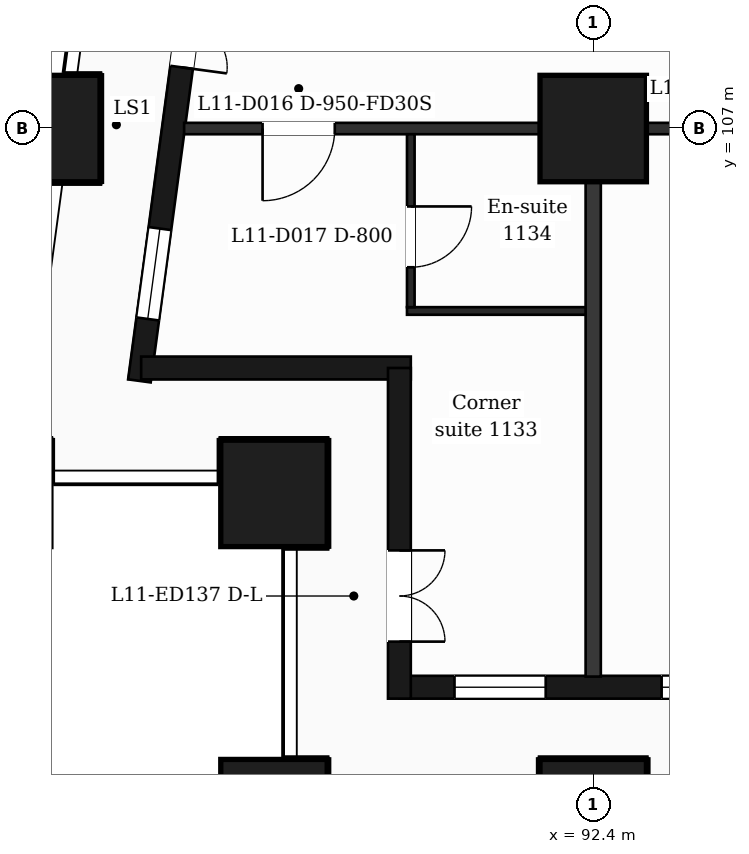
"""IFC4 building model, lengths in metres.
Left out: names, types, materials, properties, quantities, classifications, styles, units other than length and angle.
Written with IfcOpenShell. Run it as: python <this file> out.ifc"""

import sys

from ifc_helpers import new_model, si_unit, direction, frame, frame_2d, origin, origin_2d, place, context, subcontext, project, spatial, rectangle, extrude, element, fill, save


model = new_model("IFC4")
c1 = context("Model", 3, precision=1e-05, world=origin(), true_north=direction((0.0, 1.0)))
c2 = subcontext(c1, "Body", "Model", "MODEL_VIEW")
j1 = project(units=[si_unit("LENGTHUNIT", "METRE"), si_unit("PLANEANGLEUNIT", "RADIAN")], contexts=[c1])
p1 = place(None, origin())
s1 = spatial("IfcSite", under=j1, at=p1, CompositionType="ELEMENT")
p2 = place(p1, origin())
s2 = spatial("IfcBuilding", under=s1, at=p2, CompositionType="ELEMENT")
p3 = place(p2, frame((0.0, 0.0, 56.5)))
s3 = spatial("IfcBuildingStorey", under=s2, at=p3, CompositionType="ELEMENT", Elevation=56.5)
for number, where, z_axis, x_axis in (
    (1, (92.4, 98.0, 0.0), (0.0, 0.0, 1.0), (1.0, 0.0, 0.0)),
    (2, (88.2, 98.0, 0.0), (0.0, 0.0, 1.0), (1.0, 0.0, 0.0)),
    (3, (88.2, 102.2, 0.0), (0.0, 0.0, 1.0), (1.0, 0.0, 0.0)),
    (4, (92.4, 107.0, 0.0), (0.0, 0.0, 1.0), (1.0, 0.0, 0.0)),
    (5, (85.211, 107.0, 0.0), (0.0, 0.0, 1.0), (1.0, 0.0, 0.0)),
):
    element("IfcColumn", number, at=place(p3, frame(where, z_axis=z_axis, x_axis=x_axis)), inside=s3, PredefinedType="COLUMN", context=c2, shape_type="SweptSolid", body=[
        extrude(rectangle(XDim=1.4, YDim=1.4, at=origin_2d()), origin(), (0.0, 0.0, 1.0), 3.5),
    ])
p4 = place(p3, frame((89.85, 99.65, 0.0), z_axis=(0.0, 0.0, 1.0), x_axis=(1.0, 0.0, 0.0)))
e6 = element("IfcWall", 6, at=p4, inside=s3, PredefinedType="SOLIDWALL", context=c2, shape_type="SweptSolid", body=[
    extrude(rectangle(XDim=47.25, YDim=0.3, at=frame_2d((23.625, 0.0))), origin(), (0.0, 0.0, 1.0), 3.18),
])
p5 = place(p4, frame((0.725, 0.0, 0.9)))
e7 = element("IfcOpeningElement", 7, at=p5, cuts=e6, PredefinedType="OPENING", context=c2, shape_type="SweptSolid", body=[
    extrude(rectangle(XDim=1.2, YDim=2.1, at=frame_2d((0.6, 1.05))), frame((0.0, 0.16, 0.0), z_axis=(0.0, -1.0, 0.0), x_axis=(1.0, 0.0, 0.0)), (0.0, 0.0, 1.0), 0.32),
])
p6 = place(p4, frame((3.45, 0.0, 0.9)))
e8 = element("IfcOpeningElement", 8, at=p6, cuts=e6, PredefinedType="OPENING", context=c2, shape_type="SweptSolid", body=[
    extrude(rectangle(XDim=2.4, YDim=2.1, at=frame_2d((1.2, 1.05))), frame((0.0, 0.16, 0.0), z_axis=(0.0, -1.0, 0.0), x_axis=(1.0, 0.0, 0.0)), (0.0, 0.0, 1.0), 0.32),
])
p7 = place(p4, frame((7.35, 0.0, 0.0)))
e9 = element("IfcOpeningElement", 9, at=p7, cuts=e6, PredefinedType="OPENING", context=c2, shape_type="SweptSolid", body=[
    extrude(rectangle(XDim=1.2, YDim=2.4, at=frame_2d((0.6, 1.2))), frame((0.0, 0.16, 0.0), z_axis=(0.0, -1.0, 0.0), x_axis=(1.0, 0.0, 0.0)), (0.0, 0.0, 1.0), 0.32),
])
p8 = place(p4, frame((9.15, 0.0, 0.9)))
e10 = element("IfcOpeningElement", 10, at=p8, cuts=e6, PredefinedType="OPENING", context=c2, shape_type="SweptSolid", body=[
    extrude(rectangle(XDim=1.2, YDim=2.1, at=frame_2d((0.6, 1.05))), frame((0.0, 0.16, 0.0), z_axis=(0.0, -1.0, 0.0), x_axis=(1.0, 0.0, 0.0)), (0.0, 0.0, 1.0), 0.32),
])
p9 = place(p4, frame((11.85, 0.0, 0.9)))
e11 = element("IfcOpeningElement", 11, at=p9, cuts=e6, PredefinedType="OPENING", context=c2, shape_type="SweptSolid", body=[
    extrude(rectangle(XDim=2.4, YDim=2.1, at=frame_2d((1.2, 1.05))), frame((0.0, 0.16, 0.0), z_axis=(0.0, -1.0, 0.0), x_axis=(1.0, 0.0, 0.0)), (0.0, 0.0, 1.0), 0.32),
])
p10 = place(p4, frame((16.05, 0.0, 0.9)))
e12 = element("IfcOpeningElement", 12, at=p10, cuts=e6, PredefinedType="OPENING", context=c2, shape_type="SweptSolid", body=[
    extrude(rectangle(XDim=2.4, YDim=2.1, at=frame_2d((1.2, 1.05))), frame((0.0, 0.16, 0.0), z_axis=(0.0, -1.0, 0.0), x_axis=(1.0, 0.0, 0.0)), (0.0, 0.0, 1.0), 0.32),
])
p11 = place(p4, frame((20.85, 0.0, 0.9)))
e13 = element("IfcOpeningElement", 13, at=p11, cuts=e6, PredefinedType="OPENING", context=c2, shape_type="SweptSolid", body=[
    extrude(rectangle(XDim=1.2, YDim=2.1, at=frame_2d((0.6, 1.05))), frame((0.0, 0.16, 0.0), z_axis=(0.0, -1.0, 0.0), x_axis=(1.0, 0.0, 0.0)), (0.0, 0.0, 1.0), 0.32),
])
p12 = place(p4, frame((25.05, 0.0, 0.9)))
e14 = element("IfcOpeningElement", 14, at=p12, cuts=e6, PredefinedType="OPENING", context=c2, shape_type="SweptSolid", body=[
    extrude(rectangle(XDim=1.2, YDim=2.1, at=frame_2d((0.6, 1.05))), frame((0.0, 0.16, 0.0), z_axis=(0.0, -1.0, 0.0), x_axis=(1.0, 0.0, 0.0)), (0.0, 0.0, 1.0), 0.32),
])
p13 = place(p4, frame((28.65, 0.0, 0.9)))
e15 = element("IfcOpeningElement", 15, at=p13, cuts=e6, PredefinedType="OPENING", context=c2, shape_type="SweptSolid", body=[
    extrude(rectangle(XDim=2.4, YDim=2.1, at=frame_2d((1.2, 1.05))), frame((0.0, 0.16, 0.0), z_axis=(0.0, -1.0, 0.0), x_axis=(1.0, 0.0, 0.0)), (0.0, 0.0, 1.0), 0.32),
])
p14 = place(p4, frame((32.85, 0.0, 0.9)))
e16 = element("IfcOpeningElement", 16, at=p14, cuts=e6, PredefinedType="OPENING", context=c2, shape_type="SweptSolid", body=[
    extrude(rectangle(XDim=2.4, YDim=2.1, at=frame_2d((1.2, 1.05))), frame((0.0, 0.16, 0.0), z_axis=(0.0, -1.0, 0.0), x_axis=(1.0, 0.0, 0.0)), (0.0, 0.0, 1.0), 0.32),
])
p15 = place(p4, frame((37.05, 0.0, 0.9)))
e17 = element("IfcOpeningElement", 17, at=p15, cuts=e6, PredefinedType="OPENING", context=c2, shape_type="SweptSolid", body=[
    extrude(rectangle(XDim=2.4, YDim=2.1, at=frame_2d((1.2, 1.05))), frame((0.0, 0.16, 0.0), z_axis=(0.0, -1.0, 0.0), x_axis=(1.0, 0.0, 0.0)), (0.0, 0.0, 1.0), 0.32),
])
p16 = place(p4, frame((41.25, 0.0, 0.9)))
e18 = element("IfcOpeningElement", 18, at=p16, cuts=e6, PredefinedType="OPENING", context=c2, shape_type="SweptSolid", body=[
    extrude(rectangle(XDim=2.4, YDim=2.1, at=frame_2d((1.2, 1.05))), frame((0.0, 0.16, 0.0), z_axis=(0.0, -1.0, 0.0), x_axis=(1.0, 0.0, 0.0)), (0.0, 0.0, 1.0), 0.32),
])
p17 = place(p4, frame((45.25, 0.0, 0.9)))
e19 = element("IfcOpeningElement", 19, at=p17, cuts=e6, PredefinedType="OPENING", context=c2, shape_type="SweptSolid", body=[
    extrude(rectangle(XDim=1.2, YDim=2.1, at=frame_2d((0.6, 1.05))), frame((0.0, 0.16, 0.0), z_axis=(0.0, -1.0, 0.0), x_axis=(1.0, 0.0, 0.0)), (0.0, 0.0, 1.0), 0.32),
])
p18 = place(p3, frame((87.334, 110.4, 0.0), z_axis=(0.0, 0.0, 1.0), x_axis=(-0.133437175554, -0.991057273915, 0.0)))
e20 = element("IfcWall", 20, at=p18, inside=s3, PredefinedType="SOLIDWALL", context=c2, shape_type="SweptSolid", body=[
    extrude(rectangle(XDim=6.781, YDim=0.3, at=frame_2d((3.39, 0.0))), origin(), (0.0, 0.0, 1.0), 3.18),
])
p19 = place(p18, frame((1.418, 0.0, 0.0)))
e21 = element("IfcOpeningElement", 21, at=p19, cuts=e20, PredefinedType="OPENING", context=c2, shape_type="SweptSolid", body=[
    extrude(rectangle(XDim=1.2, YDim=2.4, at=frame_2d((0.6, 1.2))), frame((0.0, 0.16, 0.0), z_axis=(0.0, -1.0, 0.0), x_axis=(1.0, 0.0, 0.0)), (0.0, 0.0, 1.0), 0.32),
])
p20 = place(p18, frame((4.758, 0.0, 0.9)))
e22 = element("IfcOpeningElement", 22, at=p20, cuts=e20, PredefinedType="OPENING", context=c2, shape_type="SweptSolid", body=[
    extrude(rectangle(XDim=1.2, YDim=2.1, at=frame_2d((0.6, 1.05))), frame((0.0, 0.16, 0.0), z_axis=(0.0, -1.0, 0.0), x_axis=(1.0, 0.0, 0.0)), (0.0, 0.0, 1.0), 0.32),
])
p21 = place(p3, frame((86.452, 103.85, 0.0), z_axis=(0.0, 0.0, 1.0), x_axis=(1.0, 0.0, 0.0)))
e23 = element("IfcWall", 23, at=p21, inside=s3, PredefinedType="SOLIDWALL", context=c2, shape_type="SweptSolid", body=[
    extrude(rectangle(XDim=3.548, YDim=0.3, at=frame_2d((1.774, 0.0))), origin(), (0.0, 0.0, 1.0), 3.18),
])
p22 = place(p3, frame((89.85, 103.85, 0.0), z_axis=(0.0, 0.0, 1.0), x_axis=(0.0, -1.0, 0.0)))
e24 = element("IfcWall", 24, at=p22, inside=s3, PredefinedType="SOLIDWALL", context=c2, shape_type="SweptSolid", body=[
    extrude(rectangle(XDim=4.35, YDim=0.3, at=frame_2d((2.175, 0.0))), origin(), (0.0, 0.0, 1.0), 3.18),
])
p23 = place(p22, frame((2.4, 0.0, 0.0)))
e25 = element("IfcOpeningElement", 25, at=p23, cuts=e24, PredefinedType="OPENING", context=c2, shape_type="SweptSolid", body=[
    extrude(rectangle(XDim=1.2, YDim=2.4, at=frame_2d((0.6, 1.2))), frame((0.0, 0.16, 0.0), z_axis=(0.0, -1.0, 0.0), x_axis=(1.0, 0.0, 0.0)), (0.0, 0.0, 1.0), 0.32),
])
p24 = place(p3, frame((89.95, 104.6, 0.0), z_axis=(0.0, 0.0, 1.0), x_axis=(1.0, 0.0, 0.0)))
e26 = element("IfcWall", 26, at=p24, inside=s3, PredefinedType="PARTITIONING", context=c2, shape_type="SweptSolid", body=[
    extrude(rectangle(XDim=2.45, YDim=0.1, at=frame_2d((1.225, 0.0))), origin(), (0.0, 0.0, 1.0), 3.18),
])
p25 = place(p3, frame((87.018, 107.0, 0.0), z_axis=(0.0, 0.0, 1.0), x_axis=(1.0, 0.0, 0.0)))
e27 = element("IfcWall", 27, at=p25, inside=s3, PredefinedType="PARTITIONING", context=c2, shape_type="SweptSolid", body=[
    extrude(rectangle(XDim=52.765, YDim=0.15, at=frame_2d((26.382, 0.0))), origin(), (0.0, 0.0, 1.0), 3.18),
])
p26 = place(p25, frame((1.032, 0.0, 0.0)))
e28 = element("IfcOpeningElement", 28, at=p26, cuts=e27, PredefinedType="OPENING", context=c2, shape_type="SweptSolid", body=[
    extrude(rectangle(XDim=0.95, YDim=2.1, at=frame_2d((0.475, 1.05))), frame((0.0, 0.085, 0.0), z_axis=(0.0, -1.0, 0.0), x_axis=(1.0, 0.0, 0.0)), (0.0, 0.0, 1.0), 0.17),
])
p27 = place(p25, frame((6.894, 0.0, 0.0)))
e29 = element("IfcOpeningElement", 29, at=p27, cuts=e27, PredefinedType="OPENING", context=c2, shape_type="SweptSolid", body=[
    extrude(rectangle(XDim=0.95, YDim=2.1, at=frame_2d((0.475, 1.05))), frame((0.0, 0.085, 0.0), z_axis=(0.0, -1.0, 0.0), x_axis=(1.0, 0.0, 0.0)), (0.0, 0.0, 1.0), 0.17),
])
p28 = place(p25, frame((17.844, 0.0, 0.0)))
e30 = element("IfcOpeningElement", 30, at=p28, cuts=e27, PredefinedType="OPENING", context=c2, shape_type="SweptSolid", body=[
    extrude(rectangle(XDim=0.95, YDim=2.1, at=frame_2d((0.475, 1.05))), frame((0.0, 0.085, 0.0), z_axis=(0.0, -1.0, 0.0), x_axis=(1.0, 0.0, 0.0)), (0.0, 0.0, 1.0), 0.17),
])
p29 = place(p25, frame((26.245, 0.0, 0.0)))
e31 = element("IfcOpeningElement", 31, at=p29, cuts=e27, PredefinedType="OPENING", context=c2, shape_type="SweptSolid", body=[
    extrude(rectangle(XDim=0.95, YDim=2.1, at=frame_2d((0.475, 1.05))), frame((0.0, 0.085, 0.0), z_axis=(0.0, -1.0, 0.0), x_axis=(1.0, 0.0, 0.0)), (0.0, 0.0, 1.0), 0.17),
])
p30 = place(p25, frame((35.822, 0.0, 0.0)))
e32 = element("IfcOpeningElement", 32, at=p30, cuts=e27, PredefinedType="OPENING", context=c2, shape_type="SweptSolid", body=[
    extrude(rectangle(XDim=0.95, YDim=2.1, at=frame_2d((0.475, 1.05))), frame((0.0, 0.085, 0.0), z_axis=(0.0, -1.0, 0.0), x_axis=(1.0, 0.0, 0.0)), (0.0, 0.0, 1.0), 0.17),
])
p31 = place(p25, frame((42.302, 0.0, 0.0)))
e33 = element("IfcOpeningElement", 33, at=p31, cuts=e27, PredefinedType="OPENING", context=c2, shape_type="SweptSolid", body=[
    extrude(rectangle(XDim=0.95, YDim=2.1, at=frame_2d((0.475, 1.05))), frame((0.0, 0.085, 0.0), z_axis=(0.0, -1.0, 0.0), x_axis=(1.0, 0.0, 0.0)), (0.0, 0.0, 1.0), 0.17),
])
p32 = place(p25, frame((49.285, 0.0, 0.0)))
e34 = element("IfcOpeningElement", 34, at=p32, cuts=e27, PredefinedType="OPENING", context=c2, shape_type="SweptSolid", body=[
    extrude(rectangle(XDim=0.95, YDim=2.1, at=frame_2d((0.475, 1.05))), frame((0.0, 0.085, 0.0), z_axis=(0.0, -1.0, 0.0), x_axis=(1.0, 0.0, 0.0)), (0.0, 0.0, 1.0), 0.17),
])
p33 = place(p3, frame((90.0, 104.65, 0.0), z_axis=(0.0, 0.0, 1.0), x_axis=(0.0, 1.0, 0.0)))
e35 = element("IfcWall", 35, at=p33, inside=s3, PredefinedType="PARTITIONING", context=c2, shape_type="SweptSolid", body=[
    extrude(rectangle(XDim=2.275, YDim=0.1, at=frame_2d((1.138, 0.0))), origin(), (0.0, 0.0, 1.0), 3.18),
])
p34 = place(p33, frame((0.525, 0.0, 0.0)))
e36 = element("IfcOpeningElement", 36, at=p34, cuts=e35, PredefinedType="OPENING", context=c2, shape_type="SweptSolid", body=[
    extrude(rectangle(XDim=0.8, YDim=2.1, at=frame_2d((0.4, 1.05))), frame((0.0, 0.06, 0.0), z_axis=(0.0, -1.0, 0.0), x_axis=(1.0, 0.0, 0.0)), (0.0, 0.0, 1.0), 0.12),
])
p35 = place(p3, frame((92.4, 99.79, 0.0), z_axis=(0.0, 0.0, 1.0), x_axis=(0.0, 1.0, 0.0)))
e37 = element("IfcWall", 37, at=p35, inside=s3, PredefinedType="PARTITIONING", context=c2, shape_type="SweptSolid", body=[
    extrude(rectangle(XDim=7.135, YDim=0.2, at=frame_2d((3.567, 0.0))), origin(), (0.0, 0.0, 1.0), 3.18),
])
p36 = place(p5, origin())
e38 = element("IfcWindow", 38, at=p36, inside=s3, PartitioningType="SINGLE_PANEL", PredefinedType="WINDOW", context=c2, shape_type="SweptSolid", body=[
    extrude(rectangle(XDim=1.2, YDim=2.1, at=frame_2d((0.6, 1.05))), frame((0.0, 0.03, 0.0), z_axis=(0.0, -1.0, 0.0), x_axis=(1.0, 0.0, 0.0)), (0.0, 0.0, 1.0), 0.06),
])
fill(e7, e38)
p37 = place(p6, origin())
e39 = element("IfcWindow", 39, at=p37, inside=s3, PartitioningType="SINGLE_PANEL", PredefinedType="WINDOW", context=c2, shape_type="SweptSolid", body=[
    extrude(rectangle(XDim=2.4, YDim=2.1, at=frame_2d((1.2, 1.05))), frame((0.0, 0.03, 0.0), z_axis=(0.0, -1.0, 0.0), x_axis=(1.0, 0.0, 0.0)), (0.0, 0.0, 1.0), 0.06),
])
fill(e8, e39)
p38 = place(p19, origin())
e40 = element("IfcDoor", 40, at=p38, inside=s3, OperationType="DOUBLE_DOOR_SINGLE_SWING", PredefinedType="DOOR", context=c2, shape_type="SweptSolid", body=[
    extrude(rectangle(XDim=1.2, YDim=2.4, at=frame_2d((0.6, 1.2))), frame((0.0, 0.025, 0.0), z_axis=(0.0, -1.0, 0.0), x_axis=(1.0, 0.0, 0.0)), (0.0, 0.0, 1.0), 0.05),
])
fill(e21, e40)
p39 = place(p20, origin())
e41 = element("IfcWindow", 41, at=p39, inside=s3, PartitioningType="SINGLE_PANEL", PredefinedType="WINDOW", context=c2, shape_type="SweptSolid", body=[
    extrude(rectangle(XDim=1.2, YDim=2.1, at=frame_2d((0.6, 1.05))), frame((0.0, 0.03, 0.0), z_axis=(0.0, -1.0, 0.0), x_axis=(1.0, 0.0, 0.0)), (0.0, 0.0, 1.0), 0.06),
])
fill(e22, e41)
p40 = place(p23, origin())
e42 = element("IfcDoor", 42, at=p40, inside=s3, OperationType="DOUBLE_DOOR_SINGLE_SWING", PredefinedType="DOOR", context=c2, shape_type="SweptSolid", body=[
    extrude(rectangle(XDim=1.2, YDim=2.4, at=frame_2d((0.6, 1.2))), frame((0.0, 0.025, 0.0), z_axis=(0.0, -1.0, 0.0), x_axis=(1.0, 0.0, 0.0)), (0.0, 0.0, 1.0), 0.05),
])
fill(e25, e42)
p41 = place(p26, origin())
e43 = element("IfcDoor", 43, at=p41, inside=s3, OperationType="SINGLE_SWING_LEFT", PredefinedType="DOOR", context=c2, shape_type="SweptSolid", body=[
    extrude(rectangle(XDim=0.95, YDim=2.1, at=frame_2d((0.475, 1.05))), frame((0.0, 0.025, 0.0), z_axis=(0.0, -1.0, 0.0), x_axis=(1.0, 0.0, 0.0)), (0.0, 0.0, 1.0), 0.05),
])
fill(e28, e43)
p42 = place(p34, origin())
e44 = element("IfcDoor", 44, at=p42, inside=s3, OperationType="SINGLE_SWING_RIGHT", PredefinedType="DOOR", context=c2, shape_type="SweptSolid", body=[
    extrude(rectangle(XDim=0.8, YDim=2.1, at=frame_2d((0.4, 1.05))), frame((0.0, 0.025, 0.0), z_axis=(0.0, -1.0, 0.0), x_axis=(1.0, 0.0, 0.0)), (0.0, 0.0, 1.0), 0.05),
])
fill(e36, e44)
save(model, sys.argv[1])
